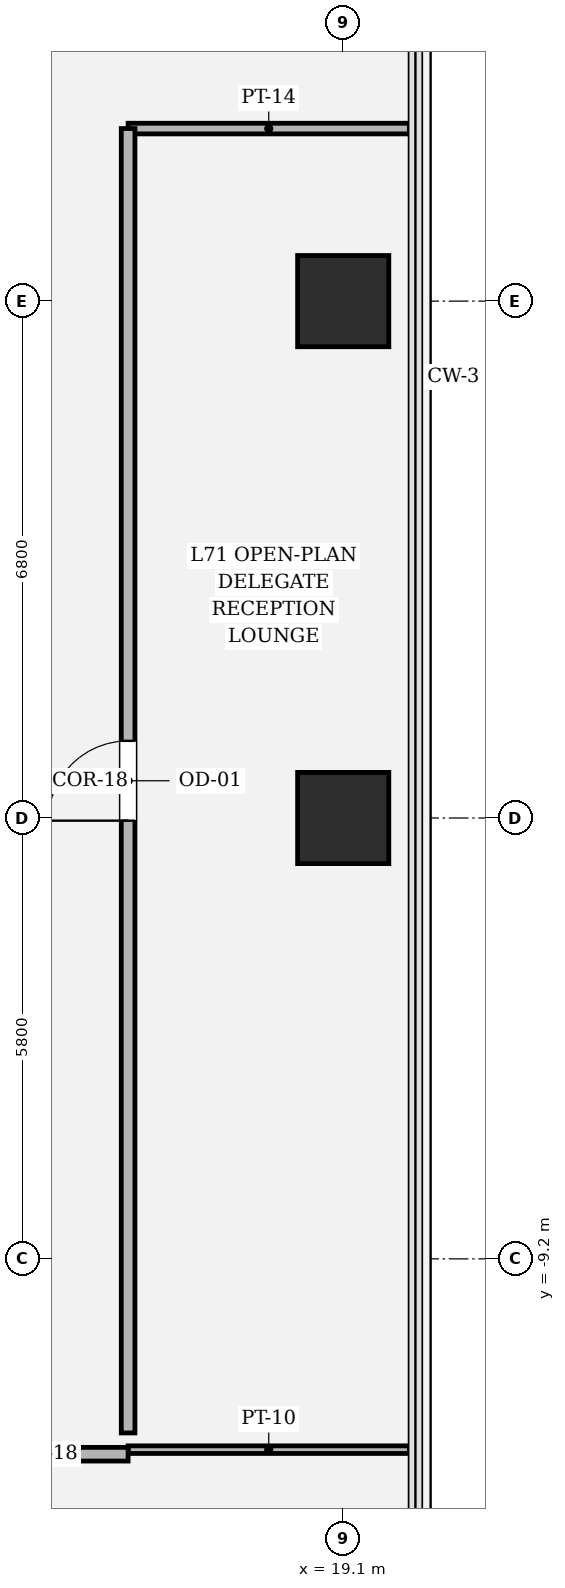
"""IFC4 building model, lengths in metres.
Left out: names, types, materials, properties, quantities, classifications, styles, units other than length and angle.
Written with IfcOpenShell. Run it as: python <this file> out.ifc"""

import sys

from ifc_helpers import new_model, si_unit, direction, frame, frame_2d, origin, origin_2d, place, context, subcontext, project, spatial, rectangle, hollow_rectangle, extrude, element, fill, save


model = new_model("IFC4")
c1 = context("Model", 3, precision=1e-05, world=origin(), true_north=direction((0.0, 1.0)))
c2 = subcontext(c1, "Body", "Model", "MODEL_VIEW")
j1 = project(units=[si_unit("LENGTHUNIT", "METRE"), si_unit("PLANEANGLEUNIT", "RADIAN")], contexts=[c1])
p1 = place(None, origin())
s1 = spatial("IfcSite", under=j1, at=p1, CompositionType="ELEMENT")
p2 = place(p1, origin())
s2 = spatial("IfcBuilding", under=s1, at=p2, CompositionType="ELEMENT")
p3 = place(p2, frame((0.0, 0.0, 300.6)))
s3 = spatial("IfcBuildingStorey", under=s2, at=p3, CompositionType="ELEMENT", Elevation=300.6)
for number, where, z_axis, x_axis in (
    (1, (19.1, -3.4, 0.0), (0.0, 0.0, 1.0), (1.0, 0.0, 0.0)),
    (2, (19.1, 3.4, 0.0), (0.0, 0.0, 1.0), (1.0, 0.0, 0.0)),
):
    element("IfcColumn", number, at=place(p3, frame(where, z_axis=z_axis, x_axis=x_axis)), inside=s3, PredefinedType="COLUMN", context=c2, shape_type="SweptSolid", body=[
        extrude(hollow_rectangle(XDim=1.2, YDim=1.2, WallThickness=0.035, at=origin_2d()), origin(), (0.0, 0.0, 1.0), 4.2),
    ])
p4 = place(p3, frame((16.27, -11.71, 0.0), z_axis=(0.0, 0.0, 1.0), x_axis=(1.0, 0.0, 0.0)))
e3 = element("IfcWall", 3, at=p4, inside=s3, PredefinedType="PARTITIONING", context=c2, shape_type="SweptSolid", body=[
    extrude(rectangle(XDim=3.7, YDim=0.1, at=frame_2d((1.85, 0.0))), origin(), (0.0, 0.0, 1.0), 3.394),
])
p5 = place(p3, frame((12.939, -11.77, 0.0), z_axis=(0.0, 0.0, 1.0), x_axis=(1.0, 0.0, 0.0)))
e4 = element("IfcWall", 4, at=p5, inside=s3, PredefinedType="PARTITIONING", context=c2, shape_type="SweptSolid", body=[
    extrude(rectangle(XDim=3.331, YDim=0.18, at=frame_2d((1.666, 0.0))), origin(), (0.0, 0.0, 1.0), 3.634),
])
p6 = place(p5, frame((1.156, 0.0, 0.0)))
e5 = element("IfcOpeningElement", 5, at=p6, cuts=e4, PredefinedType="OPENING", context=c2, shape_type="SweptSolid", body=[
    extrude(rectangle(XDim=1.02, YDim=2.2, at=frame_2d((0.51, 1.1))), frame((0.0, 0.1, 0.0), z_axis=(0.0, -1.0, 0.0), x_axis=(1.0, 0.0, 0.0)), (0.0, 0.0, 1.0), 0.2),
])
p7 = place(p3, frame((16.27, 5.67, 0.0), z_axis=(0.0, 0.0, 1.0), x_axis=(1.0, 0.0, 0.0)))
e6 = element("IfcWall", 6, at=p7, inside=s3, PredefinedType="PARTITIONING", context=c2, shape_type="SweptSolid", body=[
    extrude(rectangle(XDim=3.7, YDim=0.14, at=frame_2d((1.85, 0.0))), origin(), (0.0, 0.0, 1.0), 3.394),
])
p8 = place(p3, frame((16.27, -11.49, 0.0), z_axis=(0.0, 0.0, 1.0), x_axis=(0.0, 1.0, 0.0)))
e7 = element("IfcWall", 7, at=p8, inside=s3, PredefinedType="PARTITIONING", context=c2, shape_type="SweptSolid", body=[
    extrude(rectangle(XDim=17.16, YDim=0.18, at=frame_2d((8.58, 0.0))), origin(), (0.0, 0.0, 1.0), 3.394),
])
p9 = place(p8, frame((8.055, 0.0, 0.0)))
e8 = element("IfcOpeningElement", 8, at=p9, cuts=e7, PredefinedType="OPENING", context=c2, shape_type="SweptSolid", body=[
    extrude(rectangle(XDim=1.05, YDim=2.2, at=frame_2d((0.525, 1.1))), frame((0.0, 0.1, 0.0), z_axis=(0.0, -1.0, 0.0), x_axis=(1.0, 0.0, 0.0)), (0.0, 0.0, 1.0), 0.2),
])
p10 = place(p9, origin())
e9 = element("IfcDoor", 9, at=p10, inside=s3, OperationType="SINGLE_SWING_LEFT", PredefinedType="DOOR", context=c2, shape_type="SweptSolid", body=[
    extrude(rectangle(XDim=1.05, YDim=2.2, at=frame_2d((0.525, 1.1))), frame((0.0, 0.025, 0.0), z_axis=(0.0, -1.0, 0.0), x_axis=(1.0, 0.0, 0.0)), (0.0, 0.0, 1.0), 0.05),
])
fill(e8, e9)
save(model, sys.argv[1])
